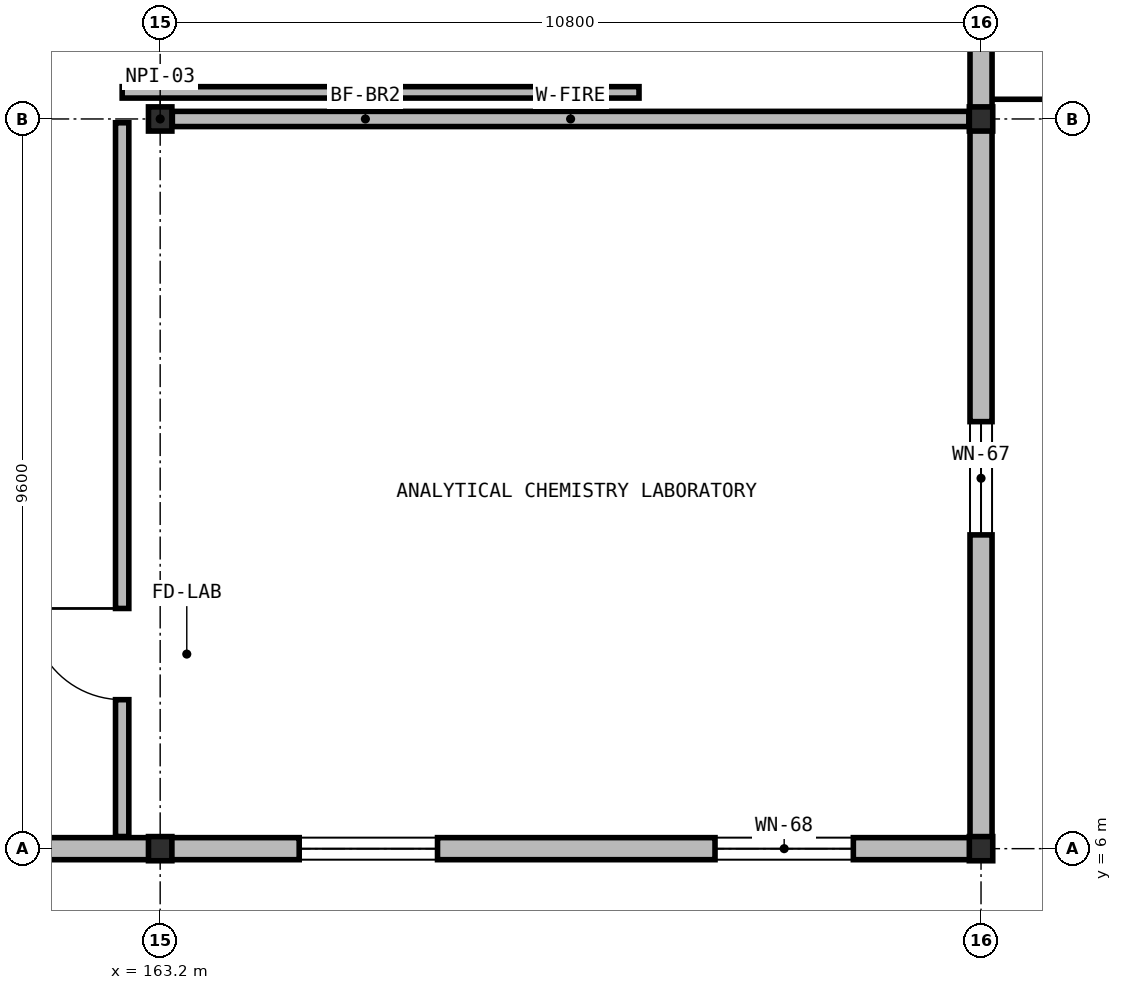
"""IFC4 building model, lengths in metres.
Left out: names, types, materials, properties, quantities, classifications, styles, units other than length and angle.
Written with IfcOpenShell. Run it as: python <this file> out.ifc"""

import sys

from ifc_helpers import new_model, si_unit, direction, frame, frame_2d, origin, origin_2d, place, context, subcontext, project, spatial, rectangle, i_section, extrude, element, fill, save


model = new_model("IFC4")
c1 = context("Model", 3, precision=1e-05, world=origin(), true_north=direction((0.0, 1.0)))
c2 = subcontext(c1, "Body", "Model", "MODEL_VIEW")
j1 = project(units=[si_unit("LENGTHUNIT", "METRE"), si_unit("PLANEANGLEUNIT", "RADIAN")], contexts=[c1])
p1 = place(None, origin())
s1 = spatial("IfcSite", under=j1, at=p1, CompositionType="ELEMENT")
p2 = place(p1, origin())
s2 = spatial("IfcBuilding", under=s1, at=p2, CompositionType="ELEMENT")
p3 = place(p2, frame((0.0, 0.0, 37.1)))
s3 = spatial("IfcBuildingStorey", under=s2, at=p3, CompositionType="ELEMENT", Elevation=37.1)
for number, where, z_axis, x_axis in (
    (1, (163.2, 6.0, 0.0), (0.0, 0.0, 1.0), (1.0, 0.0, 0.0)),
    (2, (163.2, 15.6, 0.0), (0.0, 0.0, 1.0), (1.0, 0.0, 0.0)),
    (3, (174.0, 6.0, 0.0), (0.0, 0.0, 1.0), (1.0, 0.0, 0.0)),
    (4, (174.0, 15.6, 0.0), (0.0, 0.0, 1.0), (1.0, 0.0, 0.0)),
):
    element("IfcColumn", number, at=place(p3, frame(where, z_axis=z_axis, x_axis=x_axis)), inside=s3, PredefinedType="COLUMN", context=c2, shape_type="SweptSolid", body=[
        extrude(i_section(OverallWidth=0.308, OverallDepth=0.318, WebThickness=0.013, FlangeThickness=0.021, at=origin_2d()), origin(), (0.0, 0.0, 1.0), 4.55),
    ])
p4 = place(p3, frame((174.0, 25.196, 0.0), z_axis=(0.0, 0.0, 1.0), x_axis=(0.0, -1.0, 0.0)))
e5 = element("IfcWall", 5, at=p4, inside=s3, PredefinedType="SOLIDWALL", context=c2, shape_type="SweptSolid", body=[
    extrude(rectangle(XDim=9.592, YDim=0.29, at=frame_2d((4.796, 0.0))), origin(), (0.0, 0.0, 1.0), 3.899),
])
p5 = place(p4, frame((4.216, 0.0, 0.95)))
e6 = element("IfcOpeningElement", 6, at=p5, cuts=e5, PredefinedType="OPENING", context=c2, shape_type="SweptSolid", body=[
    extrude(rectangle(XDim=1.16, YDim=1.4, at=frame_2d((0.58, 0.7))), frame((0.0, 0.155, 0.0), z_axis=(0.0, -1.0, 0.0), x_axis=(1.0, 0.0, 0.0)), (0.0, 0.0, 1.0), 0.31),
])
p6 = place(p3, frame((174.0, 15.596, 0.0), z_axis=(0.0, 0.0, 1.0), x_axis=(0.0, -1.0, 0.0)))
e7 = element("IfcWall", 7, at=p6, inside=s3, PredefinedType="SOLIDWALL", context=c2, shape_type="SweptSolid", body=[
    extrude(rectangle(XDim=9.447, YDim=0.29, at=frame_2d((4.724, 0.0))), origin(), (0.0, 0.0, 1.0), 3.899),
])
p7 = place(p6, frame((3.978, 0.0, 0.95)))
e8 = element("IfcOpeningElement", 8, at=p7, cuts=e7, PredefinedType="OPENING", context=c2, shape_type="SweptSolid", body=[
    extrude(rectangle(XDim=1.49, YDim=1.8, at=frame_2d((0.745, 0.9))), frame((0.0, 0.155, 0.0), z_axis=(0.0, -1.0, 0.0), x_axis=(1.0, 0.0, 0.0)), (0.0, 0.0, 1.0), 0.31),
])
p8 = place(p3, frame((174.145, 6.0, 0.0), z_axis=(0.0, 0.0, 1.0), x_axis=(-1.0, 0.0, 0.0)))
e9 = element("IfcWall", 9, at=p8, inside=s3, PredefinedType="SOLIDWALL", context=c2, shape_type="SweptSolid", body=[
    extrude(rectangle(XDim=10.941, YDim=0.29, at=frame_2d((5.47, 0.0))), origin(), (0.0, 0.0, 1.0), 3.831),
])
p9 = place(p8, frame((1.825, 0.0, 0.95)))
e10 = element("IfcOpeningElement", 10, at=p9, cuts=e9, PredefinedType="OPENING", context=c2, shape_type="SweptSolid", body=[
    extrude(rectangle(XDim=1.82, YDim=1.72, at=frame_2d((0.91, 0.86))), frame((0.0, 0.155, 0.0), z_axis=(0.0, -1.0, 0.0), x_axis=(1.0, 0.0, 0.0)), (0.0, 0.0, 1.0), 0.31),
])
p10 = place(p8, frame((7.296, 0.0, 0.95)))
e11 = element("IfcOpeningElement", 11, at=p10, cuts=e9, PredefinedType="OPENING", context=c2, shape_type="SweptSolid", body=[
    extrude(rectangle(XDim=1.82, YDim=1.72, at=frame_2d((0.91, 0.86))), frame((0.0, 0.155, 0.0), z_axis=(0.0, -1.0, 0.0), x_axis=(1.0, 0.0, 0.0)), (0.0, 0.0, 1.0), 0.31),
])
p11 = place(p3, frame((163.196, 6.0, 0.0), z_axis=(0.0, 0.0, 1.0), x_axis=(-1.0, 0.0, 0.0)))
e12 = element("IfcWall", 12, at=p11, inside=s3, PredefinedType="SOLIDWALL", context=c2, shape_type="SweptSolid", body=[
    extrude(rectangle(XDim=9.741, YDim=0.29, at=frame_2d((4.871, 0.0))), origin(), (0.0, 0.0, 1.0), 3.899),
])
p12 = place(p11, frame((6.066, 0.0, 0.95)))
e13 = element("IfcOpeningElement", 13, at=p12, cuts=e12, PredefinedType="OPENING", context=c2, shape_type="SweptSolid", body=[
    extrude(rectangle(XDim=2.48, YDim=1.56, at=frame_2d((1.24, 0.78))), frame((0.0, 0.155, 0.0), z_axis=(0.0, -1.0, 0.0), x_axis=(1.0, 0.0, 0.0)), (0.0, 0.0, 1.0), 0.31),
])
p13 = place(p3, frame((163.36, 15.6, 0.0), z_axis=(0.0, 0.0, 1.0), x_axis=(1.0, 0.0, 0.0)))
e14 = element("IfcWall", 14, at=p13, inside=s3, PredefinedType="SOLIDWALL", context=c2, shape_type="SweptSolid", body=[
    extrude(rectangle(XDim=10.48, YDim=0.2, at=frame_2d((5.24, 0.0))), origin(), (0.0, 0.0, 1.0), 3.752),
])
p14 = place(p3, frame((162.7, 6.16, 0.0), z_axis=(0.0, 0.0, 1.0), x_axis=(0.0, 1.0, 0.0)))
e15 = element("IfcWall", 15, at=p14, inside=s3, PredefinedType="PARTITIONING", context=c2, shape_type="SweptSolid", body=[
    extrude(rectangle(XDim=9.39, YDim=0.175, at=frame_2d((4.695, 0.0))), origin(), (0.0, 0.0, 1.0), 4.3),
])
p15 = place(p14, frame((1.8, 0.0, 0.0)))
e16 = element("IfcOpeningElement", 16, at=p15, cuts=e15, PredefinedType="OPENING", context=c2, shape_type="SweptSolid", body=[
    extrude(rectangle(XDim=1.2, YDim=2.2, at=frame_2d((0.6, 1.1))), frame((0.0, 0.097, 0.0), z_axis=(0.0, -1.0, 0.0), x_axis=(1.0, 0.0, 0.0)), (0.0, 0.0, 1.0), 0.195),
])
p16 = place(p3, frame((162.7, 15.95, 0.0), z_axis=(0.0, 0.0, 1.0), x_axis=(1.0, 0.0, 0.0)))
e17 = element("IfcWall", 17, at=p16, inside=s3, PredefinedType="PARTITIONING", context=c2, shape_type="SweptSolid", body=[
    extrude(rectangle(XDim=6.8, YDim=0.15, at=frame_2d((3.4, 0.0))), origin(), (0.0, 0.0, 1.0), 4.3),
])
p17 = place(p7, origin())
e18 = element("IfcWindow", 18, at=p17, inside=s3, PartitioningType="SINGLE_PANEL", PredefinedType="WINDOW", context=c2, shape_type="SweptSolid", body=[
    extrude(rectangle(XDim=1.49, YDim=1.8, at=frame_2d((0.745, 0.9))), frame((0.0, 0.03, 0.0), z_axis=(0.0, -1.0, 0.0), x_axis=(1.0, 0.0, 0.0)), (0.0, 0.0, 1.0), 0.06),
])
fill(e8, e18)
p18 = place(p9, origin())
e19 = element("IfcWindow", 19, at=p18, inside=s3, PartitioningType="SINGLE_PANEL", PredefinedType="WINDOW", context=c2, shape_type="SweptSolid", body=[
    extrude(rectangle(XDim=1.82, YDim=1.72, at=frame_2d((0.91, 0.86))), frame((0.0, 0.03, 0.0), z_axis=(0.0, -1.0, 0.0), x_axis=(1.0, 0.0, 0.0)), (0.0, 0.0, 1.0), 0.06),
])
fill(e10, e19)
p19 = place(p10, origin())
e20 = element("IfcWindow", 20, at=p19, inside=s3, PartitioningType="SINGLE_PANEL", PredefinedType="WINDOW", context=c2, shape_type="SweptSolid", body=[
    extrude(rectangle(XDim=1.82, YDim=1.72, at=frame_2d((0.91, 0.86))), frame((0.0, 0.03, 0.0), z_axis=(0.0, -1.0, 0.0), x_axis=(1.0, 0.0, 0.0)), (0.0, 0.0, 1.0), 0.06),
])
fill(e11, e20)
p20 = place(p15, origin())
e21 = element("IfcDoor", 21, at=p20, inside=s3, OperationType="SINGLE_SWING_RIGHT", PredefinedType="DOOR", context=c2, shape_type="SweptSolid", body=[
    extrude(rectangle(XDim=1.2, YDim=2.2, at=frame_2d((0.6, 1.1))), frame((0.0, 0.025, 0.0), z_axis=(0.0, -1.0, 0.0), x_axis=(1.0, 0.0, 0.0)), (0.0, 0.0, 1.0), 0.05),
])
fill(e16, e21)
save(model, sys.argv[1])
